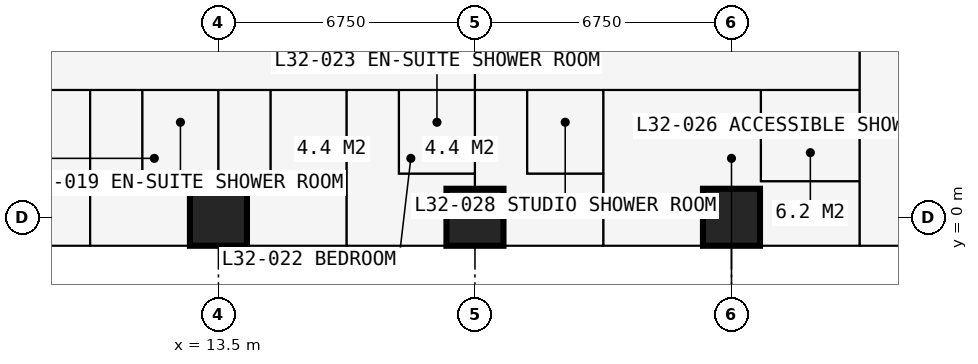
"""IFC4 building model, lengths in metres.
Left out: names, types, materials, properties, quantities, classifications, styles, units other than length and angle.
Written with IfcOpenShell. Run it as: python <this file> out.ifc"""

import sys

from ifc_helpers import new_model, si_unit, direction, frame, frame_2d, origin, origin_2d, place, context, subcontext, project, spatial, rectangle, extrude, element, fill, save


model = new_model("IFC4")
c1 = context("Model", 3, precision=1e-05, world=origin(), true_north=direction((0.0, 1.0)))
c2 = subcontext(c1, "Body", "Model", "MODEL_VIEW")
j1 = project(units=[si_unit("LENGTHUNIT", "METRE"), si_unit("PLANEANGLEUNIT", "RADIAN")], contexts=[c1])
p1 = place(None, origin())
s1 = spatial("IfcSite", under=j1, at=p1, CompositionType="ELEMENT")
p2 = place(p1, origin())
s2 = spatial("IfcBuilding", under=s1, at=p2, CompositionType="ELEMENT")
p3 = place(p2, frame((0.0, 0.0, 119.7)))
s3 = spatial("IfcBuildingStorey", under=s2, at=p3, CompositionType="ELEMENT", Elevation=119.7)
for number, where, z_axis, x_axis in (
    (1, (13.5, 0.0, 0.0), (0.0, 0.0, 1.0), (1.0, 0.0, 0.0)),
    (2, (20.25, 0.0, 0.0), (0.0, 0.0, 1.0), (1.0, 0.0, 0.0)),
    (3, (27.0, 0.0, 0.0), (0.0, 0.0, 1.0), (1.0, 0.0, 0.0)),
):
    element("IfcColumn", number, at=place(p3, frame(where, z_axis=z_axis, x_axis=x_axis)), inside=s3, PredefinedType="COLUMN", context=c2, shape_type="SweptSolid", body=[
        extrude(rectangle(XDim=1.5, YDim=1.5, at=origin_2d()), origin(), (0.0, 0.0, 1.0), 3.6),
    ])
p4 = place(p3, frame((27.0, -0.75, 0.0), z_axis=(0.0, 0.0, 1.0), x_axis=(-1.0, 0.0, 0.0)))
e4 = element("IfcWall", 4, at=p4, inside=s3, PredefinedType="SOLIDWALL", context=c2, shape_type="SweptSolid", body=[
    extrude(rectangle(XDim=6.75, YDim=0.15, at=frame_2d((3.375, 0.0))), origin(), (0.0, 0.0, 1.0), 3.375),
])
p5 = place(p4, frame((0.863, 0.0, 0.0)))
e5 = element("IfcOpeningElement", 5, at=p5, cuts=e4, PredefinedType="OPENING", context=c2, shape_type="SweptSolid", body=[
    extrude(rectangle(XDim=1.0, YDim=2.2, at=frame_2d((0.5, 1.1))), frame((0.0, 0.085, 0.0), z_axis=(0.0, -1.0, 0.0), x_axis=(1.0, 0.0, 0.0)), (0.0, 0.0, 1.0), 0.17),
])
p6 = place(p4, frame((1.975, 0.0, 0.9)))
e6 = element("IfcOpeningElement", 6, at=p6, cuts=e4, PredefinedType="OPENING", context=c2, shape_type="SweptSolid", body=[
    extrude(rectangle(XDim=1.2, YDim=1.8, at=frame_2d((0.6, 0.9))), frame((0.0, 0.085, 0.0), z_axis=(0.0, -1.0, 0.0), x_axis=(1.0, 0.0, 0.0)), (0.0, 0.0, 1.0), 0.17),
])
p7 = place(p4, frame((4.887, 0.0, 0.0)))
e7 = element("IfcOpeningElement", 7, at=p7, cuts=e4, PredefinedType="OPENING", context=c2, shape_type="SweptSolid", body=[
    extrude(rectangle(XDim=1.0, YDim=2.2, at=frame_2d((0.5, 1.1))), frame((0.0, 0.085, 0.0), z_axis=(0.0, -1.0, 0.0), x_axis=(1.0, 0.0, 0.0)), (0.0, 0.0, 1.0), 0.17),
])
p8 = place(p4, frame((3.575, 0.0, 0.9)))
e8 = element("IfcOpeningElement", 8, at=p8, cuts=e4, PredefinedType="OPENING", context=c2, shape_type="SweptSolid", body=[
    extrude(rectangle(XDim=1.2, YDim=1.8, at=frame_2d((0.6, 0.9))), frame((0.0, 0.085, 0.0), z_axis=(0.0, -1.0, 0.0), x_axis=(1.0, 0.0, 0.0)), (0.0, 0.0, 1.0), 0.17),
])
p9 = place(p3, frame((23.625, -0.85, 0.0), z_axis=(0.0, 0.0, 1.0), x_axis=(0.0, -1.0, 0.0)))
e9 = element("IfcWall", 9, at=p9, inside=s3, PredefinedType="USERDEFINED", context=c2, shape_type="SweptSolid", body=[
    extrude(rectangle(XDim=2.2, YDim=1.0, at=frame_2d((1.1, 0.0))), origin(), (0.0, 0.0, 1.0), 0.9),
])
p10 = place(p3, frame((6.75, 3.35, 0.0), z_axis=(0.0, 0.0, 1.0), x_axis=(1.0, 0.0, 0.0)))
e10 = element("IfcWall", 10, at=p10, inside=s3, PredefinedType="PARTITIONING", context=c2, shape_type="SweptSolid", body=[
    extrude(rectangle(XDim=23.625, YDim=0.1, at=frame_2d((11.812, 0.0))), origin(), (0.0, 0.0, 1.0), 3.375),
])
p11 = place(p10, frame((1.2, 0.0, 0.0)))
e11 = element("IfcOpeningElement", 11, at=p11, cuts=e10, PredefinedType="OPENING", context=c2, shape_type="SweptSolid", body=[
    extrude(rectangle(XDim=1.0, YDim=2.2, at=frame_2d((0.5, 1.1))), frame((0.0, 0.06, 0.0), z_axis=(0.0, -1.0, 0.0), x_axis=(1.0, 0.0, 0.0)), (0.0, 0.0, 1.0), 0.12),
])
p12 = place(p10, frame((3.575, 0.0, 0.0)))
e12 = element("IfcOpeningElement", 12, at=p12, cuts=e10, PredefinedType="OPENING", context=c2, shape_type="SweptSolid", body=[
    extrude(rectangle(XDim=0.95, YDim=2.2, at=frame_2d((0.475, 1.1))), frame((0.0, 0.06, 0.0), z_axis=(0.0, -1.0, 0.0), x_axis=(1.0, 0.0, 0.0)), (0.0, 0.0, 1.0), 0.12),
])
p13 = place(p10, frame((6.95, 0.0, 0.0)))
e13 = element("IfcOpeningElement", 13, at=p13, cuts=e10, PredefinedType="OPENING", context=c2, shape_type="SweptSolid", body=[
    extrude(rectangle(XDim=0.95, YDim=2.2, at=frame_2d((0.475, 1.1))), frame((0.0, 0.06, 0.0), z_axis=(0.0, -1.0, 0.0), x_axis=(1.0, 0.0, 0.0)), (0.0, 0.0, 1.0), 0.12),
])
p14 = place(p10, frame((10.325, 0.0, 0.0)))
e14 = element("IfcOpeningElement", 14, at=p14, cuts=e10, PredefinedType="OPENING", context=c2, shape_type="SweptSolid", body=[
    extrude(rectangle(XDim=0.95, YDim=2.2, at=frame_2d((0.475, 1.1))), frame((0.0, 0.06, 0.0), z_axis=(0.0, -1.0, 0.0), x_axis=(1.0, 0.0, 0.0)), (0.0, 0.0, 1.0), 0.12),
])
p15 = place(p10, frame((18.475, 0.0, 0.0)))
e15 = element("IfcOpeningElement", 15, at=p15, cuts=e10, PredefinedType="OPENING", context=c2, shape_type="SweptSolid", body=[
    extrude(rectangle(XDim=0.95, YDim=2.2, at=frame_2d((0.475, 1.1))), frame((0.0, 0.06, 0.0), z_axis=(0.0, -1.0, 0.0), x_axis=(1.0, 0.0, 0.0)), (0.0, 0.0, 1.0), 0.12),
])
p16 = place(p10, frame((13.7, 0.0, 0.0)))
e16 = element("IfcOpeningElement", 16, at=p16, cuts=e10, PredefinedType="OPENING", context=c2, shape_type="SweptSolid", body=[
    extrude(rectangle(XDim=0.95, YDim=2.2, at=frame_2d((0.475, 1.1))), frame((0.0, 0.06, 0.0), z_axis=(0.0, -1.0, 0.0), x_axis=(1.0, 0.0, 0.0)), (0.0, 0.0, 1.0), 0.12),
])
p17 = place(p3, frame((10.125, -0.734, 0.0), z_axis=(0.0, 0.0, 1.0), x_axis=(0.0, 1.0, 0.0)))
e17 = element("IfcWall", 17, at=p17, inside=s3, PredefinedType="PARTITIONING", context=c2, shape_type="SweptSolid", body=[
    extrude(rectangle(XDim=4.084, YDim=0.15, at=frame_2d((2.042, 0.0))), origin(), (0.0, 0.0, 1.0), 3.375),
])
p18 = place(p3, frame((11.5, 1.15, 0.0), z_axis=(0.0, 0.0, 1.0), x_axis=(0.0, 1.0, 0.0)))
e18 = element("IfcWall", 18, at=p18, inside=s3, PredefinedType="PARTITIONING", context=c2, shape_type="SweptSolid", body=[
    extrude(rectangle(XDim=2.2, YDim=0.1, at=frame_2d((1.1, 0.0))), origin(), (0.0, 0.0, 1.0), 3.375),
])
p19 = place(p18, frame((0.65, 0.0, 0.0)))
e19 = element("IfcOpeningElement", 19, at=p19, cuts=e18, PredefinedType="OPENING", context=c2, shape_type="SweptSolid", body=[
    extrude(rectangle(XDim=0.9, YDim=2.2, at=frame_2d((0.45, 1.1))), frame((0.0, 0.06, 0.0), z_axis=(0.0, -1.0, 0.0), x_axis=(1.0, 0.0, 0.0)), (0.0, 0.0, 1.0), 0.12),
])
p20 = place(p3, frame((11.5, 1.15, 0.0), z_axis=(0.0, 0.0, 1.0), x_axis=(1.0, 0.0, 0.0)))
e20 = element("IfcWall", 20, at=p20, inside=s3, PredefinedType="PARTITIONING", context=c2, shape_type="SweptSolid", body=[
    extrude(rectangle(XDim=2.0, YDim=0.1, at=frame_2d((1.0, 0.0))), origin(), (0.0, 0.0, 1.0), 3.375),
])
p21 = place(p3, frame((13.5, -0.734, 0.0), z_axis=(0.0, 0.0, 1.0), x_axis=(0.0, 1.0, 0.0)))
e21 = element("IfcWall", 21, at=p21, inside=s3, PredefinedType="PARTITIONING", context=c2, shape_type="SweptSolid", body=[
    extrude(rectangle(XDim=4.084, YDim=0.1, at=frame_2d((2.042, 0.0))), origin(), (0.0, 0.0, 1.0), 2.61),
])
p22 = place(p3, frame((14.875, 1.15, 0.0), z_axis=(0.0, 0.0, 1.0), x_axis=(0.0, 1.0, 0.0)))
e22 = element("IfcWall", 22, at=p22, inside=s3, PredefinedType="PARTITIONING", context=c2, shape_type="SweptSolid", body=[
    extrude(rectangle(XDim=2.2, YDim=0.1, at=frame_2d((1.1, 0.0))), origin(), (0.0, 0.0, 1.0), 3.375),
])
p23 = place(p22, frame((0.65, 0.0, 0.0)))
e23 = element("IfcOpeningElement", 23, at=p23, cuts=e22, PredefinedType="OPENING", context=c2, shape_type="SweptSolid", body=[
    extrude(rectangle(XDim=0.9, YDim=2.2, at=frame_2d((0.45, 1.1))), frame((0.0, 0.06, 0.0), z_axis=(0.0, -1.0, 0.0), x_axis=(1.0, 0.0, 0.0)), (0.0, 0.0, 1.0), 0.12),
])
p24 = place(p3, frame((14.875, 1.15, 0.0), z_axis=(0.0, 0.0, 1.0), x_axis=(1.0, 0.0, 0.0)))
e24 = element("IfcWall", 24, at=p24, inside=s3, PredefinedType="PARTITIONING", context=c2, shape_type="SweptSolid", body=[
    extrude(rectangle(XDim=2.0, YDim=0.1, at=frame_2d((1.0, 0.0))), origin(), (0.0, 0.0, 1.0), 3.375),
])
p25 = place(p3, frame((16.875, -0.734, 0.0), z_axis=(0.0, 0.0, 1.0), x_axis=(0.0, 1.0, 0.0)))
e25 = element("IfcWall", 25, at=p25, inside=s3, PredefinedType="PARTITIONING", context=c2, shape_type="SweptSolid", body=[
    extrude(rectangle(XDim=4.084, YDim=0.1, at=frame_2d((2.042, 0.0))), origin(), (0.0, 0.0, 1.0), 3.375),
])
p26 = place(p3, frame((18.25, 1.15, 0.0), z_axis=(0.0, 0.0, 1.0), x_axis=(0.0, 1.0, 0.0)))
e26 = element("IfcWall", 26, at=p26, inside=s3, PredefinedType="PARTITIONING", context=c2, shape_type="SweptSolid", body=[
    extrude(rectangle(XDim=2.2, YDim=0.1, at=frame_2d((1.1, 0.0))), origin(), (0.0, 0.0, 1.0), 3.375),
])
p27 = place(p26, frame((0.65, 0.0, 0.0)))
e27 = element("IfcOpeningElement", 27, at=p27, cuts=e26, PredefinedType="OPENING", context=c2, shape_type="SweptSolid", body=[
    extrude(rectangle(XDim=0.9, YDim=2.2, at=frame_2d((0.45, 1.1))), frame((0.0, 0.06, 0.0), z_axis=(0.0, -1.0, 0.0), x_axis=(1.0, 0.0, 0.0)), (0.0, 0.0, 1.0), 0.12),
])
p28 = place(p3, frame((18.25, 1.15, 0.0), z_axis=(0.0, 0.0, 1.0), x_axis=(1.0, 0.0, 0.0)))
e28 = element("IfcWall", 28, at=p28, inside=s3, PredefinedType="PARTITIONING", context=c2, shape_type="SweptSolid", body=[
    extrude(rectangle(XDim=2.0, YDim=0.1, at=frame_2d((1.0, 0.0))), origin(), (0.0, 0.0, 1.0), 3.375),
])
p29 = place(p3, frame((20.25, -0.734, 0.0), z_axis=(0.0, 0.0, 1.0), x_axis=(0.0, 1.0, 0.0)))
e29 = element("IfcWall", 29, at=p29, inside=s3, PredefinedType="PARTITIONING", context=c2, shape_type="SweptSolid", body=[
    extrude(rectangle(XDim=12.034, YDim=0.15, at=frame_2d((6.017, 0.0))), origin(), (0.0, 0.0, 1.0), 2.61),
])
p30 = place(p3, frame((21.625, 1.15, 0.0), z_axis=(0.0, 0.0, 1.0), x_axis=(0.0, 1.0, 0.0)))
e30 = element("IfcWall", 30, at=p30, inside=s3, PredefinedType="PARTITIONING", context=c2, shape_type="SweptSolid", body=[
    extrude(rectangle(XDim=2.2, YDim=0.1, at=frame_2d((1.1, 0.0))), origin(), (0.0, 0.0, 1.0), 3.375),
])
p31 = place(p3, frame((21.625, 1.15, 0.0), z_axis=(0.0, 0.0, 1.0), x_axis=(1.0, 0.0, 0.0)))
e31 = element("IfcWall", 31, at=p31, inside=s3, PredefinedType="PARTITIONING", context=c2, shape_type="SweptSolid", body=[
    extrude(rectangle(XDim=2.0, YDim=0.1, at=frame_2d((1.0, 0.0))), origin(), (0.0, 0.0, 1.0), 3.375),
])
p32 = place(p3, frame((23.625, -0.734, 0.0), z_axis=(0.0, 0.0, 1.0), x_axis=(0.0, 1.0, 0.0)))
e32 = element("IfcWall", 32, at=p32, inside=s3, PredefinedType="PARTITIONING", context=c2, shape_type="SweptSolid", body=[
    extrude(rectangle(XDim=4.084, YDim=0.1, at=frame_2d((2.042, 0.0))), origin(), (0.0, 0.0, 1.0), 3.375),
])
p33 = place(p32, frame((2.534, 0.0, 0.0)))
e33 = element("IfcOpeningElement", 33, at=p33, cuts=e32, PredefinedType="OPENING", context=c2, shape_type="SweptSolid", body=[
    extrude(rectangle(XDim=0.9, YDim=2.2, at=frame_2d((0.45, 1.1))), frame((0.0, 0.06, 0.0), z_axis=(0.0, -1.0, 0.0), x_axis=(1.0, 0.0, 0.0)), (0.0, 0.0, 1.0), 0.12),
])
p34 = place(p3, frame((27.775, 0.95, 0.0), z_axis=(0.0, 0.0, 1.0), x_axis=(0.0, 1.0, 0.0)))
e34 = element("IfcWall", 34, at=p34, inside=s3, PredefinedType="PARTITIONING", context=c2, shape_type="SweptSolid", body=[
    extrude(rectangle(XDim=2.4, YDim=0.1, at=frame_2d((1.2, 0.0))), origin(), (0.0, 0.0, 1.0), 3.375),
])
p35 = place(p3, frame((27.775, 0.95, 0.0), z_axis=(0.0, 0.0, 1.0), x_axis=(1.0, 0.0, 0.0)))
e35 = element("IfcWall", 35, at=p35, inside=s3, PredefinedType="PARTITIONING", context=c2, shape_type="SweptSolid", body=[
    extrude(rectangle(XDim=2.6, YDim=0.1, at=frame_2d((1.3, 0.0))), origin(), (0.0, 0.0, 1.0), 3.375),
])
p36 = place(p35, frame((0.85, 0.0, 0.0)))
e36 = element("IfcOpeningElement", 36, at=p36, cuts=e35, PredefinedType="OPENING", context=c2, shape_type="SweptSolid", body=[
    extrude(rectangle(XDim=0.9, YDim=2.2, at=frame_2d((0.45, 1.1))), frame((0.0, 0.06, 0.0), z_axis=(0.0, -1.0, 0.0), x_axis=(1.0, 0.0, 0.0)), (0.0, 0.0, 1.0), 0.12),
])
p37 = place(p3, frame((30.375, -0.734, 0.0), z_axis=(0.0, 0.0, 1.0), x_axis=(0.0, 1.0, 0.0)))
e37 = element("IfcWall", 37, at=p37, inside=s3, PredefinedType="PARTITIONING", context=c2, shape_type="SweptSolid", body=[
    extrude(rectangle(XDim=12.034, YDim=0.15, at=frame_2d((6.017, 0.0))), origin(), (0.0, 0.0, 1.0), 3.375),
])
p38 = place(p37, frame((4.884, 0.0, 0.0)))
e38 = element("IfcOpeningElement", 38, at=p38, cuts=e37, PredefinedType="OPENING", context=c2, shape_type="SweptSolid", body=[
    extrude(rectangle(XDim=1.0, YDim=2.2, at=frame_2d((0.5, 1.1))), frame((0.0, 0.085, 0.0), z_axis=(0.0, -1.0, 0.0), x_axis=(1.0, 0.0, 0.0)), (0.0, 0.0, 1.0), 0.17),
])
p39 = place(p5, origin())
e39 = element("IfcDoor", 39, at=p39, inside=s3, OperationType="SINGLE_SWING_LEFT", PredefinedType="DOOR", context=c2, shape_type="SweptSolid", body=[
    extrude(rectangle(XDim=1.0, YDim=2.2, at=frame_2d((0.5, 1.1))), frame((0.0, 0.025, 0.0), z_axis=(0.0, -1.0, 0.0), x_axis=(1.0, 0.0, 0.0)), (0.0, 0.0, 1.0), 0.05),
])
fill(e5, e39)
p40 = place(p6, origin())
e40 = element("IfcWindow", 40, at=p40, inside=s3, PartitioningType="SINGLE_PANEL", PredefinedType="WINDOW", context=c2, shape_type="SweptSolid", body=[
    extrude(rectangle(XDim=1.2, YDim=1.8, at=frame_2d((0.6, 0.9))), frame((0.0, 0.03, 0.0), z_axis=(0.0, -1.0, 0.0), x_axis=(1.0, 0.0, 0.0)), (0.0, 0.0, 1.0), 0.06),
])
fill(e6, e40)
p41 = place(p7, origin())
e41 = element("IfcDoor", 41, at=p41, inside=s3, OperationType="SINGLE_SWING_RIGHT", PredefinedType="DOOR", context=c2, shape_type="SweptSolid", body=[
    extrude(rectangle(XDim=1.0, YDim=2.2, at=frame_2d((0.5, 1.1))), frame((0.0, 0.025, 0.0), z_axis=(0.0, -1.0, 0.0), x_axis=(1.0, 0.0, 0.0)), (0.0, 0.0, 1.0), 0.05),
])
fill(e7, e41)
p42 = place(p8, origin())
e42 = element("IfcWindow", 42, at=p42, inside=s3, PartitioningType="SINGLE_PANEL", PredefinedType="WINDOW", context=c2, shape_type="SweptSolid", body=[
    extrude(rectangle(XDim=1.2, YDim=1.8, at=frame_2d((0.6, 0.9))), frame((0.0, 0.03, 0.0), z_axis=(0.0, -1.0, 0.0), x_axis=(1.0, 0.0, 0.0)), (0.0, 0.0, 1.0), 0.06),
])
fill(e8, e42)
p43 = place(p12, origin())
e43 = element("IfcDoor", 43, at=p43, inside=s3, OperationType="SINGLE_SWING_LEFT", PredefinedType="DOOR", context=c2, shape_type="SweptSolid", body=[
    extrude(rectangle(XDim=0.95, YDim=2.2, at=frame_2d((0.475, 1.1))), frame((0.0, 0.025, 0.0), z_axis=(0.0, -1.0, 0.0), x_axis=(1.0, 0.0, 0.0)), (0.0, 0.0, 1.0), 0.05),
])
fill(e12, e43)
p44 = place(p19, origin())
e44 = element("IfcDoor", 44, at=p44, inside=s3, OperationType="SINGLE_SWING_RIGHT", PredefinedType="DOOR", context=c2, shape_type="SweptSolid", body=[
    extrude(rectangle(XDim=0.9, YDim=2.2, at=frame_2d((0.45, 1.1))), frame((0.0, 0.025, 0.0), z_axis=(0.0, -1.0, 0.0), x_axis=(1.0, 0.0, 0.0)), (0.0, 0.0, 1.0), 0.05),
])
fill(e19, e44)
p45 = place(p13, origin())
e45 = element("IfcDoor", 45, at=p45, inside=s3, OperationType="SINGLE_SWING_LEFT", PredefinedType="DOOR", context=c2, shape_type="SweptSolid", body=[
    extrude(rectangle(XDim=0.95, YDim=2.2, at=frame_2d((0.475, 1.1))), frame((0.0, 0.025, 0.0), z_axis=(0.0, -1.0, 0.0), x_axis=(1.0, 0.0, 0.0)), (0.0, 0.0, 1.0), 0.05),
])
fill(e13, e45)
p46 = place(p23, origin())
e46 = element("IfcDoor", 46, at=p46, inside=s3, OperationType="SINGLE_SWING_RIGHT", PredefinedType="DOOR", context=c2, shape_type="SweptSolid", body=[
    extrude(rectangle(XDim=0.9, YDim=2.2, at=frame_2d((0.45, 1.1))), frame((0.0, 0.025, 0.0), z_axis=(0.0, -1.0, 0.0), x_axis=(1.0, 0.0, 0.0)), (0.0, 0.0, 1.0), 0.05),
])
fill(e23, e46)
p47 = place(p14, origin())
e47 = element("IfcDoor", 47, at=p47, inside=s3, OperationType="SINGLE_SWING_LEFT", PredefinedType="DOOR", context=c2, shape_type="SweptSolid", body=[
    extrude(rectangle(XDim=0.95, YDim=2.2, at=frame_2d((0.475, 1.1))), frame((0.0, 0.025, 0.0), z_axis=(0.0, -1.0, 0.0), x_axis=(1.0, 0.0, 0.0)), (0.0, 0.0, 1.0), 0.05),
])
fill(e14, e47)
p48 = place(p27, origin())
e48 = element("IfcDoor", 48, at=p48, inside=s3, OperationType="SINGLE_SWING_RIGHT", PredefinedType="DOOR", context=c2, shape_type="SweptSolid", body=[
    extrude(rectangle(XDim=0.9, YDim=2.2, at=frame_2d((0.45, 1.1))), frame((0.0, 0.025, 0.0), z_axis=(0.0, -1.0, 0.0), x_axis=(1.0, 0.0, 0.0)), (0.0, 0.0, 1.0), 0.05),
])
fill(e27, e48)
p49 = place(p15, origin())
e49 = element("IfcDoor", 49, at=p49, inside=s3, OperationType="SINGLE_SWING_LEFT", PredefinedType="DOOR", context=c2, shape_type="SweptSolid", body=[
    extrude(rectangle(XDim=0.95, YDim=2.2, at=frame_2d((0.475, 1.1))), frame((0.0, 0.025, 0.0), z_axis=(0.0, -1.0, 0.0), x_axis=(1.0, 0.0, 0.0)), (0.0, 0.0, 1.0), 0.05),
])
fill(e15, e49)
p50 = place(p36, origin())
e50 = element("IfcDoor", 50, at=p50, inside=s3, OperationType="SINGLE_SWING_RIGHT", PredefinedType="DOOR", context=c2, shape_type="SweptSolid", body=[
    extrude(rectangle(XDim=0.9, YDim=2.2, at=frame_2d((0.45, 1.1))), frame((0.0, 0.025, 0.0), z_axis=(0.0, -1.0, 0.0), x_axis=(1.0, 0.0, 0.0)), (0.0, 0.0, 1.0), 0.05),
])
fill(e36, e50)
p51 = place(p16, origin())
e51 = element("IfcDoor", 51, at=p51, inside=s3, OperationType="SINGLE_SWING_LEFT", PredefinedType="DOOR", context=c2, shape_type="SweptSolid", body=[
    extrude(rectangle(XDim=0.95, YDim=2.2, at=frame_2d((0.475, 1.1))), frame((0.0, 0.025, 0.0), z_axis=(0.0, -1.0, 0.0), x_axis=(1.0, 0.0, 0.0)), (0.0, 0.0, 1.0), 0.05),
])
fill(e16, e51)
p52 = place(p33, origin())
e52 = element("IfcDoor", 52, at=p52, inside=s3, OperationType="SINGLE_SWING_RIGHT", PredefinedType="DOOR", context=c2, shape_type="SweptSolid", body=[
    extrude(rectangle(XDim=0.9, YDim=2.2, at=frame_2d((0.45, 1.1))), frame((0.0, 0.025, 0.0), z_axis=(0.0, -1.0, 0.0), x_axis=(1.0, 0.0, 0.0)), (0.0, 0.0, 1.0), 0.05),
])
fill(e33, e52)
p53 = place(p38, origin())
e53 = element("IfcDoor", 53, at=p53, inside=s3, OperationType="SINGLE_SWING_LEFT", PredefinedType="DOOR", context=c2, shape_type="SweptSolid", body=[
    extrude(rectangle(XDim=1.0, YDim=2.2, at=frame_2d((0.5, 1.1))), frame((0.0, 0.025, 0.0), z_axis=(0.0, -1.0, 0.0), x_axis=(1.0, 0.0, 0.0)), (0.0, 0.0, 1.0), 0.05),
])
fill(e38, e53)
save(model, sys.argv[1])
